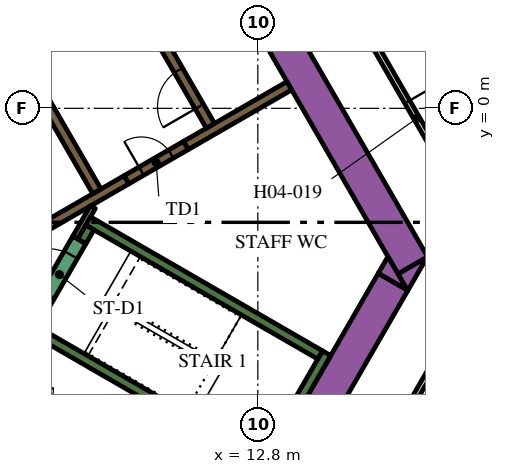
"""IFC4 building model, lengths in metres.
Left out: names, types, materials, properties, quantities, classifications, styles, units other than length and angle.
Written with IfcOpenShell. Run it as: python <this file> out.ifc"""

import sys

from ifc_helpers import new_model, si_unit, direction, frame, frame_2d, origin, place, context, subcontext, project, spatial, polyline, rectangle, outline, extrude, element, fill, save


model = new_model("IFC4")
c1 = context("Model", 3, precision=1e-05, world=origin(), true_north=direction((0.0, 1.0)))
c2 = subcontext(c1, "Body", "Model", "MODEL_VIEW")
j1 = project(units=[si_unit("LENGTHUNIT", "METRE"), si_unit("PLANEANGLEUNIT", "RADIAN")], contexts=[c1])
p1 = place(None, origin())
s1 = spatial("IfcSite", under=j1, at=p1, CompositionType="ELEMENT")
p2 = place(p1, origin())
s2 = spatial("IfcBuilding", under=s1, at=p2, CompositionType="ELEMENT")
p3 = place(p2, frame((0.0, 0.0, 66.6)))
s3 = spatial("IfcBuildingStorey", under=s2, at=p3, CompositionType="ELEMENT", Elevation=66.6)
p4 = place(p3, frame((6.461, 13.909, 0.0), z_axis=(0.0, 0.0, 1.0), x_axis=(0.500005804227, -0.866022052686, 0.0)))
e1 = element("IfcWall", 1, at=p4, inside=s3, PredefinedType="SOLIDWALL", context=c2, shape_type="SweptSolid", body=[
    extrude(rectangle(XDim=20.834, YDim=0.9, at=frame_2d((10.417, 0.0))), origin(), (0.0, 0.0, 1.0), 3.9),
])
p5 = place(p3, origin())
e2 = element("IfcWall", 2, at=p5, inside=s3, PredefinedType="SOLIDWALL", context=c2, shape_type="SweptSolid", body=[
    extrude(outline(polyline([(16.743, -4.8), (16.489, -4.36), (17.251, -3.92), (16.743, -4.8)])), origin(), (0.0, 0.0, 1.0), 3.9),
])
p6 = place(p3, frame((11.695, -12.644, 0.0), z_axis=(0.0, 0.0, 1.0), x_axis=(0.500010229568, 0.86601949766, 0.0)))
e3 = element("IfcWall", 3, at=p6, inside=s3, PredefinedType="SOLIDWALL", context=c2, shape_type="SweptSolid", body=[
    extrude(rectangle(XDim=9.326, YDim=0.9, at=frame_2d((4.663, 0.0))), origin(), (0.0, 0.0, 1.0), 3.9),
])
e4 = element("IfcWall", 4, at=p5, inside=s3, PredefinedType="SOLIDWALL", context=c2, shape_type="SweptSolid", body=[
    extrude(outline(polyline([(16.223, -3.9), (16.732, -4.78), (15.969, -4.34), (16.223, -3.9)])), origin(), (0.0, 0.0, 1.0), 3.9),
])
p7 = place(p3, frame((12.885, -9.431, 0.0), z_axis=(0.0, 0.0, 1.0), x_axis=(0.500020560727, 0.866013532718, 0.0)))
e5 = element("IfcWall", 5, at=p7, inside=s3, PredefinedType="SOLIDWALL", context=c2, shape_type="SweptSolid", body=[
    extrude(rectangle(XDim=3.45, YDim=0.25, at=frame_2d((1.725, 0.0))), origin(), (0.0, 0.0, 1.0), 3.9),
])
p8 = place(p3, frame((12.84, -9.261, 0.0), z_axis=(0.0, 0.0, 1.0), x_axis=(-0.866013990052, 0.500019768644, 0.0)))
e6 = element("IfcWall", 6, at=p8, inside=s3, PredefinedType="SOLIDWALL", context=c2, shape_type="SweptSolid", body=[
    extrude(rectangle(XDim=6.8, YDim=0.25, at=frame_2d((3.4, 0.0))), origin(), (0.0, 0.0, 1.0), 3.9),
])
p9 = place(p3, frame((8.334, -2.964, 0.0), z_axis=(0.0, 0.0, 1.0), x_axis=(0.866016039709, -0.500016218704, 0.0)))
e7 = element("IfcWall", 7, at=p9, inside=s3, PredefinedType="SOLIDWALL", context=c2, shape_type="SweptSolid", body=[
    extrude(rectangle(XDim=7.05, YDim=0.25, at=frame_2d((3.525, 0.0))), origin(), (0.0, 0.0, 1.0), 3.9),
])
p10 = place(p3, frame((8.168, -3.503, 0.0), z_axis=(0.0, 0.0, 1.0), x_axis=(0.49972245349, 0.866185586049, 0.0)))
e8 = element("IfcWall", 8, at=p10, inside=s3, PredefinedType="SOLIDWALL", context=c2, shape_type="SweptSolid", body=[
    extrude(rectangle(XDim=0.425, YDim=0.25, at=frame_2d((0.212, 0.0))), origin(), (0.0, 0.0, 1.0), 3.9),
])
p11 = place(p3, frame((13.629, 0.594, 0.0), z_axis=(0.0, 0.0, 1.0), x_axis=(-0.86602790099, -0.499995674689, 0.0)))
e9 = element("IfcWall", 9, at=p11, inside=s3, PredefinedType="SOLIDWALL", context=c2, shape_type="SweptSolid", body=[
    extrude(rectangle(XDim=3.146, YDim=0.25, at=frame_2d((1.573, 0.0))), origin(), (0.0, 0.0, 1.0), 3.9),
])
p12 = place(p3, frame((9.346, -1.879, 0.0), z_axis=(0.0, 0.0, 1.0), x_axis=(-0.866048528039, -0.499959945477, 0.0)))
e10 = element("IfcWall", 10, at=p12, inside=s3, PredefinedType="SOLIDWALL", context=c2, shape_type="SweptSolid", body=[
    extrude(rectangle(XDim=3.47, YDim=0.25, at=frame_2d((1.735, 0.0))), origin(), (0.0, 0.0, 1.0), 3.9),
])
p13 = place(p3, frame((8.459, -2.599, 0.0), z_axis=(0.0, 0.0, 1.0), x_axis=(-0.500041054325, -0.866001699761, 0.0)))
e11 = element("IfcWall", 11, at=p13, inside=s3, PredefinedType="PARTITIONING", context=c2, shape_type="SweptSolid", body=[
    extrude(rectangle(XDim=0.929, YDim=0.15, at=frame_2d((0.464, 0.0))), origin(), (0.0, 0.0, 1.0), 3.9),
])
p14 = place(p3, frame((11.553, -0.46, 0.0), z_axis=(0.0, 0.0, 1.0), x_axis=(-0.500006514828, 0.866021642414, 0.0)))
e12 = element("IfcWall", 12, at=p14, inside=s3, PredefinedType="SOLIDWALL", context=c2, shape_type="SweptSolid", body=[
    extrude(rectangle(XDim=12.35, YDim=0.25, at=frame_2d((6.175, 0.0))), origin(), (0.0, 0.0, 1.0), 3.9),
])
p15 = place(p14, frame((0.585, 0.0, 0.0)))
e13 = element("IfcOpeningElement", 13, at=p15, cuts=e12, PredefinedType="OPENING", context=c2, shape_type="SweptSolid", body=[
    extrude(rectangle(XDim=1.1, YDim=2.1, at=frame_2d((0.55, 1.05))), frame((0.0, 0.135, 0.0), z_axis=(0.0, -1.0, 0.0), x_axis=(1.0, 0.0, 0.0)), (0.0, 0.0, 1.0), 0.27),
])
p16 = place(p14, frame((3.105, 0.0, 0.0)))
e14 = element("IfcOpeningElement", 14, at=p16, cuts=e12, PredefinedType="OPENING", context=c2, shape_type="SweptSolid", body=[
    extrude(rectangle(XDim=1.1, YDim=2.1, at=frame_2d((0.55, 1.05))), frame((0.0, 0.135, 0.0), z_axis=(0.0, -1.0, 0.0), x_axis=(1.0, 0.0, 0.0)), (0.0, 0.0, 1.0), 0.27),
])
p17 = place(p14, frame((5.625, 0.0, 0.0)))
e15 = element("IfcOpeningElement", 15, at=p17, cuts=e12, PredefinedType="OPENING", context=c2, shape_type="SweptSolid", body=[
    extrude(rectangle(XDim=1.1, YDim=2.1, at=frame_2d((0.55, 1.05))), frame((0.0, 0.135, 0.0), z_axis=(0.0, -1.0, 0.0), x_axis=(1.0, 0.0, 0.0)), (0.0, 0.0, 1.0), 0.27),
])
p18 = place(p3, frame((8.565, -2.185, 0.0), z_axis=(0.0, 0.0, 1.0), x_axis=(-0.499997954832, 0.866026584559, 0.0)))
e16 = element("IfcWall", 16, at=p18, inside=s3, PredefinedType="SOLIDWALL", context=c2, shape_type="SweptSolid", body=[
    extrude(rectangle(XDim=12.35, YDim=0.25, at=frame_2d((6.175, 0.0))), origin(), (0.0, 0.0, 1.0), 3.9),
])
p19 = place(p18, frame((5.725, 0.0, 0.0)))
e17 = element("IfcOpeningElement", 17, at=p19, cuts=e16, PredefinedType="OPENING", context=c2, shape_type="SweptSolid", body=[
    extrude(rectangle(XDim=0.9, YDim=2.1, at=frame_2d((0.45, 1.05))), frame((0.0, 0.135, 0.0), z_axis=(0.0, -1.0, 0.0), x_axis=(1.0, 0.0, 0.0)), (0.0, 0.0, 1.0), 0.27),
])
p20 = place(p3, frame((7.053, -5.284, 0.0), z_axis=(0.0, 0.0, 1.0), x_axis=(0.500078061341, 0.865980330357, 0.0)))
e18 = element("IfcWall", 18, at=p20, inside=s3, PredefinedType="SOLIDWALL", context=c2, shape_type="SweptSolid", body=[
    extrude(rectangle(XDim=2.1, YDim=0.4, at=frame_2d((1.05, 0.0))), origin(), (0.0, 0.0, 1.0), 3.9),
])
p21 = place(p20, frame((0.45, 0.0, 0.0)))
e19 = element("IfcOpeningElement", 19, at=p21, cuts=e18, PredefinedType="OPENING", context=c2, shape_type="SweptSolid", body=[
    extrude(rectangle(XDim=1.2, YDim=2.1, at=frame_2d((0.6, 1.05))), frame((0.0, 0.21, 0.0), z_axis=(0.0, -1.0, 0.0), x_axis=(1.0, 0.0, 0.0)), (0.0, 0.0, 1.0), 0.42),
])
p22 = place(p3, frame((9.346, -1.879, 0.0), z_axis=(0.0, 0.0, 1.0), x_axis=(0.866047807691, 0.499961193289, 0.0)))
e20 = element("IfcWall", 20, at=p22, inside=s3, PredefinedType="SOLIDWALL", context=c2, shape_type="SweptSolid", body=[
    extrude(rectangle(XDim=1.8, YDim=0.25, at=frame_2d((0.9, 0.0))), origin(), (0.0, 0.0, 1.0), 3.9),
])
p23 = place(p22, frame((0.45, 0.0, 0.0)))
e21 = element("IfcOpeningElement", 21, at=p23, cuts=e20, PredefinedType="OPENING", context=c2, shape_type="SweptSolid", body=[
    extrude(rectangle(XDim=0.9, YDim=2.1, at=frame_2d((0.45, 1.05))), frame((0.0, 0.135, 0.0), z_axis=(0.0, -1.0, 0.0), x_axis=(1.0, 0.0, 0.0)), (0.0, 0.0, 1.0), 0.27),
])
p24 = place(p3, frame((19.081, -3.9, 0.0), z_axis=(0.0, 0.0, 1.0), x_axis=(-0.499974327079, -0.866040225545, 0.0)))
e22 = element("IfcWall", 22, at=p24, inside=s3, PredefinedType="PARTITIONING", context=c2, shape_type="SweptSolid", body=[
    extrude(rectangle(XDim=5.258, YDim=0.15, at=frame_2d((2.629, 0.0))), origin(), (0.0, 0.0, 1.0), 2.75),
])
p25 = place(p24, frame((0.18, 0.0, 0.0)))
e23 = element("IfcOpeningElement", 23, at=p25, cuts=e22, PredefinedType="OPENING", context=c2, shape_type="SweptSolid", body=[
    extrude(rectangle(XDim=1.0, YDim=2.1, at=frame_2d((0.5, 1.05))), frame((0.0, 0.085, 0.0), z_axis=(0.0, -1.0, 0.0), x_axis=(1.0, 0.0, 0.0)), (0.0, 0.0, 1.0), 0.17),
])
p26 = place(p3, frame((6.163, 18.475, 0.0), z_axis=(0.0, 0.0, 1.0), x_axis=(0.500001317485, -0.866024643133, 0.0)))
e24 = element("IfcWall", 24, at=p26, inside=s3, PredefinedType="PARTITIONING", context=c2, shape_type="SweptSolid", body=[
    extrude(rectangle(XDim=25.767, YDim=0.15, at=frame_2d((12.883, 0.0))), origin(), (0.0, 0.0, 1.0), 2.75),
])
p27 = place(p26, frame((21.138, 0.0, 0.0)))
e25 = element("IfcOpeningElement", 25, at=p27, cuts=e24, PredefinedType="OPENING", context=c2, shape_type="SweptSolid", body=[
    extrude(rectangle(XDim=1.0, YDim=2.1, at=frame_2d((0.5, 1.05))), frame((0.0, 0.085, 0.0), z_axis=(0.0, -1.0, 0.0), x_axis=(1.0, 0.0, 0.0)), (0.0, 0.0, 1.0), 0.17),
])
p28 = place(p26, frame((9.948, 0.0, 0.0)))
e26 = element("IfcOpeningElement", 26, at=p28, cuts=e24, PredefinedType="OPENING", context=c2, shape_type="SweptSolid", body=[
    extrude(rectangle(XDim=1.1, YDim=2.1, at=frame_2d((0.55, 1.05))), frame((0.0, 0.085, 0.0), z_axis=(0.0, -1.0, 0.0), x_axis=(1.0, 0.0, 0.0)), (0.0, 0.0, 1.0), 0.17),
])
p29 = place(p26, frame((8.641, 0.0, 0.0)))
e27 = element("IfcOpeningElement", 27, at=p29, cuts=e24, PredefinedType="OPENING", context=c2, shape_type="SweptSolid", body=[
    extrude(rectangle(XDim=1.0, YDim=2.1, at=frame_2d((0.5, 1.05))), frame((0.0, 0.085, 0.0), z_axis=(0.0, -1.0, 0.0), x_axis=(1.0, 0.0, 0.0)), (0.0, 0.0, 1.0), 0.17),
])
p30 = place(p26, frame((0.18, 0.0, 0.0)))
e28 = element("IfcOpeningElement", 28, at=p30, cuts=e24, PredefinedType="OPENING", context=c2, shape_type="SweptSolid", body=[
    extrude(rectangle(XDim=1.0, YDim=2.1, at=frame_2d((0.5, 1.05))), frame((0.0, 0.085, 0.0), z_axis=(0.0, -1.0, 0.0), x_axis=(1.0, 0.0, 0.0)), (0.0, 0.0, 1.0), 0.17),
])
p31 = place(p15, origin())
e29 = element("IfcDoor", 29, at=p31, inside=s3, OperationType="DOUBLE_DOOR_SLIDING", PredefinedType="DOOR", context=c2, shape_type="SweptSolid", body=[
    extrude(rectangle(XDim=1.1, YDim=2.1, at=frame_2d((0.55, 1.05))), frame((0.0, 0.025, 0.0), z_axis=(0.0, -1.0, 0.0), x_axis=(1.0, 0.0, 0.0)), (0.0, 0.0, 1.0), 0.05),
])
fill(e13, e29)
p32 = place(p21, origin())
e30 = element("IfcDoor", 30, at=p32, inside=s3, OperationType="SINGLE_SWING_LEFT", PredefinedType="DOOR", context=c2, shape_type="SweptSolid", body=[
    extrude(rectangle(XDim=1.2, YDim=2.1, at=frame_2d((0.6, 1.05))), frame((0.0, 0.025, 0.0), z_axis=(0.0, -1.0, 0.0), x_axis=(1.0, 0.0, 0.0)), (0.0, 0.0, 1.0), 0.05),
])
fill(e19, e30)
p33 = place(p23, origin())
e31 = element("IfcDoor", 31, at=p33, inside=s3, OperationType="SINGLE_SWING_LEFT", PredefinedType="DOOR", context=c2, shape_type="SweptSolid", body=[
    extrude(rectangle(XDim=0.9, YDim=2.1, at=frame_2d((0.45, 1.05))), frame((0.0, 0.025, 0.0), z_axis=(0.0, -1.0, 0.0), x_axis=(1.0, 0.0, 0.0)), (0.0, 0.0, 1.0), 0.05),
])
fill(e21, e31)
p34 = place(p27, origin())
e32 = element("IfcDoor", 32, at=p34, inside=s3, OperationType="SINGLE_SWING_RIGHT", PredefinedType="DOOR", context=c2, shape_type="SweptSolid", body=[
    extrude(rectangle(XDim=1.0, YDim=2.1, at=frame_2d((0.5, 1.05))), frame((0.0, 0.025, 0.0), z_axis=(0.0, -1.0, 0.0), x_axis=(1.0, 0.0, 0.0)), (0.0, 0.0, 1.0), 0.05),
])
fill(e25, e32)
save(model, sys.argv[1])
